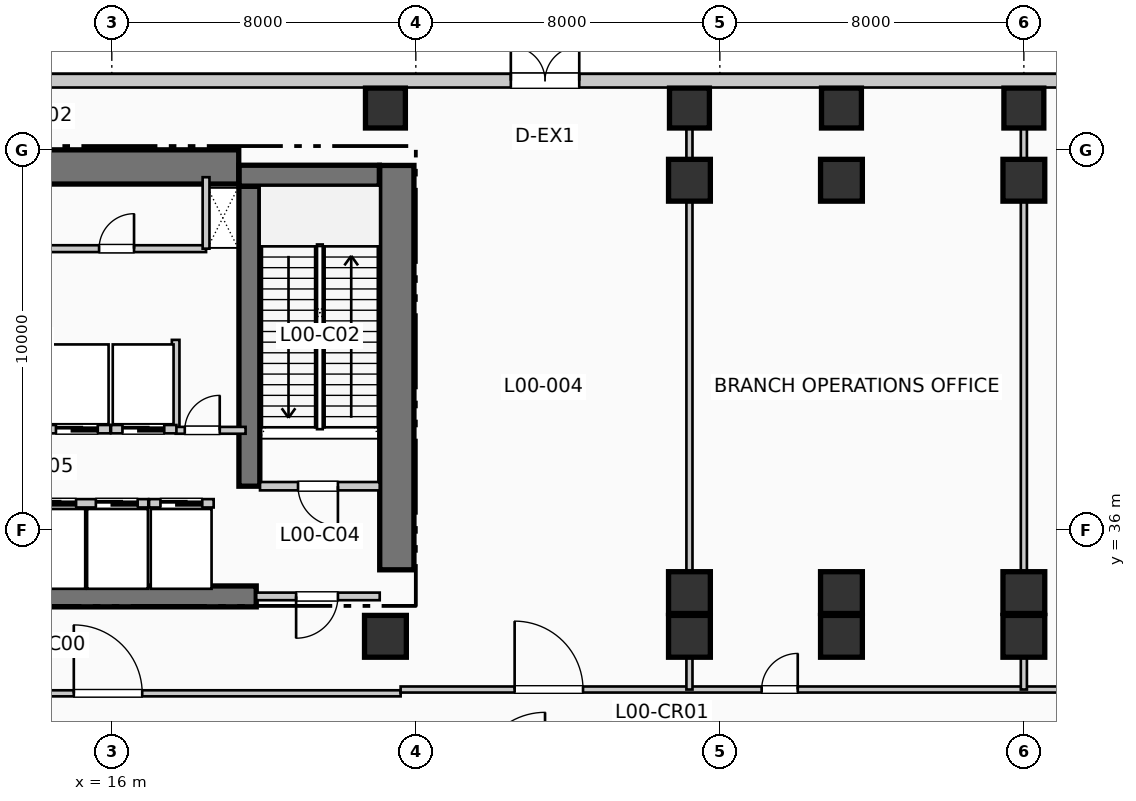
"""IFC4 building model, lengths in metres.
Left out: names, types, materials, properties, quantities, classifications, styles, units other than length and angle.
Written with IfcOpenShell. Run it as: python <this file> out.ifc"""

import sys

from ifc_helpers import new_model, si_unit, direction, frame, frame_2d, origin, origin_2d, place, context, subcontext, project, spatial, rectangle, extrude, element, fill, save


model = new_model("IFC4")
c1 = context("Model", 3, precision=1e-05, world=origin(), true_north=direction((0.0, 1.0)))
c2 = subcontext(c1, "Body", "Model", "MODEL_VIEW")
j1 = project(units=[si_unit("LENGTHUNIT", "METRE"), si_unit("PLANEANGLEUNIT", "RADIAN")], contexts=[c1])
p1 = place(None, origin())
s1 = spatial("IfcSite", under=j1, at=p1, CompositionType="ELEMENT")
p2 = place(p1, origin())
s2 = spatial("IfcBuilding", under=s1, at=p2, CompositionType="ELEMENT")
p3 = place(p2, origin())
s3 = spatial("IfcBuildingStorey", under=s2, at=p3, CompositionType="ELEMENT", Elevation=0.0)
p4 = place(p3, frame((5.36, 45.55, 0.0), z_axis=(0.0, 0.0, 1.0), x_axis=(1.0, 0.0, 0.0)))
e1 = element("IfcWall", 1, at=p4, inside=s3, PredefinedType="SHEAR", context=c2, shape_type="SweptSolid", body=[
    extrude(rectangle(XDim=13.98, YDim=0.9, at=frame_2d((6.99, 0.0))), origin(), (0.0, 0.0, 1.0), 5.94),
])
p5 = place(p3, frame((23.5, 34.95, 0.0), z_axis=(0.0, 0.0, 1.0), x_axis=(0.0, 1.0, 0.0)))
e2 = element("IfcWall", 2, at=p5, inside=s3, PredefinedType="SHEAR", context=c2, shape_type="SweptSolid", body=[
    extrude(rectangle(XDim=10.64, YDim=0.9, at=frame_2d((5.32, 0.0))), origin(), (0.0, 0.0, 1.0), 5.94),
])
p6 = place(p3, frame((13.68, 34.25, 0.0), z_axis=(0.0, 0.0, 1.0), x_axis=(1.0, 0.0, 0.0)))
e3 = element("IfcWall", 3, at=p6, inside=s3, PredefinedType="SHEAR", context=c2, shape_type="SweptSolid", body=[
    extrude(rectangle(XDim=6.12, YDim=0.55, at=frame_2d((3.06, 0.0))), origin(), (0.0, 0.0, 1.0), 5.94),
])
p7 = place(p3, frame((19.62, 37.15, 0.0), z_axis=(0.0, 0.0, 1.0), x_axis=(0.0, 1.0, 0.0)))
e4 = element("IfcWall", 4, at=p7, inside=s3, PredefinedType="SHEAR", context=c2, shape_type="SweptSolid", body=[
    extrude(rectangle(XDim=7.89, YDim=0.55, at=frame_2d((3.945, 0.0))), origin(), (0.0, 0.0, 1.0), 5.94),
])
p8 = place(p3, frame((19.35, 45.32, 0.0), z_axis=(0.0, 0.0, 1.0), x_axis=(1.0, 0.0, 0.0)))
e5 = element("IfcWall", 5, at=p8, inside=s3, PredefinedType="SHEAR", context=c2, shape_type="SweptSolid", body=[
    extrude(rectangle(XDim=3.69, YDim=0.55, at=frame_2d((1.845, 0.0))), origin(), (0.0, 0.0, 1.0), 5.94),
])
p9 = place(p3, frame((23.2, 33.2, 0.0), z_axis=(0.0, 0.0, 1.0), x_axis=(1.0, 0.0, 0.0)))
e6 = element("IfcColumn", 6, at=p9, inside=s3, PredefinedType="COLUMN", context=c2, shape_type="SweptSolid", body=[
    extrude(rectangle(XDim=1.1, YDim=1.1, at=origin_2d()), origin(), (0.0, 0.0, 1.0), 5.94),
])
p10 = place(p3, frame((23.2, 47.1, 0.0), z_axis=(0.0, 0.0, 1.0), x_axis=(1.0, 0.0, 0.0)))
e7 = element("IfcColumn", 7, at=p10, inside=s3, PredefinedType="COLUMN", context=c2, shape_type="SweptSolid", body=[
    extrude(rectangle(XDim=1.05, YDim=1.05, at=origin_2d()), origin(), (0.0, 0.0, 1.0), 5.94),
])
for number, where, z_axis, x_axis in (
    (8, (31.2, 33.2, 0.0), (0.0, 0.0, 1.0), (1.0, 0.0, 0.0)),
    (9, (31.2, 34.35, 0.0), (0.0, 0.0, 1.0), (1.0, 0.0, 0.0)),
    (10, (31.2, 45.2, 0.0), (0.0, 0.0, 1.0), (1.0, 0.0, 0.0)),
):
    element("IfcColumn", number, at=place(p3, frame(where, z_axis=z_axis, x_axis=x_axis)), inside=s3, PredefinedType="COLUMN", context=c2, shape_type="SweptSolid", body=[
        extrude(rectangle(XDim=1.1, YDim=1.1, at=origin_2d()), origin(), (0.0, 0.0, 1.0), 5.94),
    ])
p11 = place(p3, frame((31.2, 47.1, 0.0), z_axis=(0.0, 0.0, 1.0), x_axis=(1.0, 0.0, 0.0)))
e11 = element("IfcColumn", 11, at=p11, inside=s3, PredefinedType="COLUMN", context=c2, shape_type="SweptSolid", body=[
    extrude(rectangle(XDim=1.05, YDim=1.05, at=origin_2d()), origin(), (0.0, 0.0, 1.0), 5.94),
])
for number, where, z_axis, x_axis in (
    (12, (35.2, 33.2, 0.0), (0.0, 0.0, 1.0), (1.0, 0.0, 0.0)),
    (13, (35.2, 34.35, 0.0), (0.0, 0.0, 1.0), (1.0, 0.0, 0.0)),
    (14, (35.2, 45.2, 0.0), (0.0, 0.0, 1.0), (1.0, 0.0, 0.0)),
):
    element("IfcColumn", number, at=place(p3, frame(where, z_axis=z_axis, x_axis=x_axis)), inside=s3, PredefinedType="COLUMN", context=c2, shape_type="SweptSolid", body=[
        extrude(rectangle(XDim=1.1, YDim=1.1, at=origin_2d()), origin(), (0.0, 0.0, 1.0), 5.94),
    ])
p12 = place(p3, frame((35.2, 47.1, 0.0), z_axis=(0.0, 0.0, 1.0), x_axis=(1.0, 0.0, 0.0)))
e15 = element("IfcColumn", 15, at=p12, inside=s3, PredefinedType="COLUMN", context=c2, shape_type="SweptSolid", body=[
    extrude(rectangle(XDim=1.05, YDim=1.05, at=origin_2d()), origin(), (0.0, 0.0, 1.0), 5.94),
])
for number, where, z_axis, x_axis in (
    (16, (40.0, 33.2, 0.0), (0.0, 0.0, 1.0), (1.0, 0.0, 0.0)),
    (17, (40.0, 34.35, 0.0), (0.0, 0.0, 1.0), (1.0, 0.0, 0.0)),
    (18, (40.0, 45.2, 0.0), (0.0, 0.0, 1.0), (1.0, 0.0, 0.0)),
):
    element("IfcColumn", number, at=place(p3, frame(where, z_axis=z_axis, x_axis=x_axis)), inside=s3, PredefinedType="COLUMN", context=c2, shape_type="SweptSolid", body=[
        extrude(rectangle(XDim=1.1, YDim=1.1, at=origin_2d()), origin(), (0.0, 0.0, 1.0), 5.94),
    ])
p13 = place(p3, frame((40.0, 47.1, 0.0), z_axis=(0.0, 0.0, 1.0), x_axis=(1.0, 0.0, 0.0)))
e19 = element("IfcColumn", 19, at=p13, inside=s3, PredefinedType="COLUMN", context=c2, shape_type="SweptSolid", body=[
    extrude(rectangle(XDim=1.05, YDim=1.05, at=origin_2d()), origin(), (0.0, 0.0, 1.0), 5.94),
])
p14 = place(p3, frame((78.945, 47.82, 0.0), z_axis=(0.0, 0.0, 1.0), x_axis=(-1.0, 0.0, 0.0)))
e20 = element("IfcWall", 20, at=p14, inside=s3, PredefinedType="SOLIDWALL", context=c2, shape_type="SweptSolid", body=[
    extrude(rectangle(XDim=77.89, YDim=0.36, at=frame_2d((38.945, 0.0))), origin(), (0.0, 0.0, 1.0), 5.62),
])
p15 = place(p14, frame((22.145, 0.0, 0.0), z_axis=(0.0, 0.0, 1.0), x_axis=(-1.0, 0.0, 0.0)))
e21 = element("IfcOpeningElement", 21, at=p15, cuts=e20, PredefinedType="OPENING", context=c2, shape_type="SweptSolid", body=[
    extrude(rectangle(XDim=4.8, YDim=2.6, at=frame_2d((2.4, 1.3))), frame((0.0, 0.19, 0.0), z_axis=(0.0, -1.0, 0.0), x_axis=(1.0, 0.0, 0.0)), (0.0, 0.0, 1.0), 0.38),
])
p16 = place(p14, frame((11.545, 0.0, 0.0), z_axis=(0.0, 0.0, 1.0), x_axis=(-1.0, 0.0, 0.0)))
e22 = element("IfcOpeningElement", 22, at=p16, cuts=e20, PredefinedType="OPENING", context=c2, shape_type="SweptSolid", body=[
    extrude(rectangle(XDim=4.0, YDim=3.2, at=frame_2d((2.0, 1.6))), frame((0.0, 0.19, 0.0), z_axis=(0.0, -1.0, 0.0), x_axis=(1.0, 0.0, 0.0)), (0.0, 0.0, 1.0), 0.38),
])
p17 = place(p14, frame((52.445, 0.0, 0.0), z_axis=(0.0, 0.0, 1.0), x_axis=(-1.0, 0.0, 0.0)))
e23 = element("IfcOpeningElement", 23, at=p17, cuts=e20, PredefinedType="OPENING", context=c2, shape_type="SweptSolid", body=[
    extrude(rectangle(XDim=1.8, YDim=2.4, at=frame_2d((0.9, 1.2))), frame((0.0, 0.19, 0.0), z_axis=(0.0, -1.0, 0.0), x_axis=(1.0, 0.0, 0.0)), (0.0, 0.0, 1.0), 0.38),
])
p18 = place(p3, frame((19.9, 37.15, 0.0), z_axis=(0.0, 0.0, 1.0), x_axis=(1.0, 0.0, 0.0)))
e24 = element("IfcWall", 24, at=p18, inside=s3, PredefinedType="PARTITIONING", context=c2, shape_type="SweptSolid", body=[
    extrude(rectangle(XDim=3.15, YDim=0.22, at=frame_2d((1.575, 0.0))), origin(), (0.0, 0.0, 1.0), 5.62),
])
p19 = place(p18, frame((2.05, 0.0, 0.0), z_axis=(0.0, 0.0, 1.0), x_axis=(-1.0, 0.0, 0.0)))
e25 = element("IfcOpeningElement", 25, at=p19, cuts=e24, PredefinedType="OPENING", context=c2, shape_type="SweptSolid", body=[
    extrude(rectangle(XDim=1.05, YDim=2.15, at=frame_2d((0.525, 1.075))), frame((0.0, 0.12, 0.0), z_axis=(0.0, -1.0, 0.0), x_axis=(1.0, 0.0, 0.0)), (0.0, 0.0, 1.0), 0.24),
])
p20 = place(p3, frame((19.8, 34.25, 0.0), z_axis=(0.0, 0.0, 1.0), x_axis=(1.0, 0.0, 0.0)))
e26 = element("IfcWall", 26, at=p20, inside=s3, PredefinedType="PARTITIONING", context=c2, shape_type="SweptSolid", body=[
    extrude(rectangle(XDim=3.25, YDim=0.2, at=frame_2d((1.625, 0.0))), origin(), (0.0, 0.0, 1.0), 5.62),
])
p21 = place(p20, frame((2.15, 0.0, 0.0), z_axis=(0.0, 0.0, 1.0), x_axis=(-1.0, 0.0, 0.0)))
e27 = element("IfcOpeningElement", 27, at=p21, cuts=e26, PredefinedType="OPENING", context=c2, shape_type="SweptSolid", body=[
    extrude(rectangle(XDim=1.1, YDim=2.15, at=frame_2d((0.55, 1.075))), frame((0.0, 0.11, 0.0), z_axis=(0.0, -1.0, 0.0), x_axis=(1.0, 0.0, 0.0)), (0.0, 0.0, 1.0), 0.22),
])
p22 = place(p3, frame((17.68, 38.65, 0.0), z_axis=(0.0, 0.0, 1.0), x_axis=(0.0, 1.0, 0.0)))
e28 = element("IfcWall", 28, at=p22, inside=s3, PredefinedType="PARTITIONING", context=c2, shape_type="SweptSolid", body=[
    extrude(rectangle(XDim=2.35, YDim=0.2, at=frame_2d((1.175, 0.0))), origin(), (0.0, 0.0, 1.0), 5.62),
])
p23 = place(p3, frame((17.68, 38.62, 0.0), z_axis=(0.0, 0.0, 1.0), x_axis=(1.0, 0.0, 0.0)))
e29 = element("IfcWall", 29, at=p23, inside=s3, PredefinedType="PARTITIONING", context=c2, shape_type="SweptSolid", body=[
    extrude(rectangle(XDim=1.84, YDim=0.18, at=frame_2d((0.92, 0.0))), origin(), (0.0, 0.0, 1.0), 5.62),
])
p24 = place(p23, frame((0.24, 0.0, 0.0)))
e30 = element("IfcOpeningElement", 30, at=p24, cuts=e29, PredefinedType="OPENING", context=c2, shape_type="SweptSolid", body=[
    extrude(rectangle(XDim=0.92, YDim=2.1, at=frame_2d((0.46, 1.05))), frame((0.0, 0.1, 0.0), z_axis=(0.0, -1.0, 0.0), x_axis=(1.0, 0.0, 0.0)), (0.0, 0.0, 1.0), 0.2),
])
p25 = place(p3, frame((13.68, 36.7, 0.0), z_axis=(0.0, 0.0, 1.0), x_axis=(1.0, 0.0, 0.0)))
e31 = element("IfcWall", 31, at=p25, inside=s3, PredefinedType="PARTITIONING", context=c2, shape_type="SweptSolid", body=[
    extrude(rectangle(XDim=3.28, YDim=0.22, at=frame_2d((1.64, 0.0))), origin(), (0.0, 0.0, 1.0), 5.62),
])
p26 = place(p25, frame((0.28, 0.0, 0.0)))
e32 = element("IfcOpeningElement", 32, at=p26, cuts=e31, PredefinedType="OPENING", context=c2, shape_type="SweptSolid", body=[
    extrude(rectangle(XDim=1.1, YDim=2.2, at=frame_2d((0.55, 1.1))), frame((0.0, 0.12, 0.0), z_axis=(0.0, -1.0, 0.0), x_axis=(1.0, 0.0, 0.0)), (0.0, 0.0, 1.0), 0.24),
])
p27 = place(p25, frame((1.9, 0.0, 0.0)))
e33 = element("IfcOpeningElement", 33, at=p27, cuts=e31, PredefinedType="OPENING", context=c2, shape_type="SweptSolid", body=[
    extrude(rectangle(XDim=1.1, YDim=2.2, at=frame_2d((0.55, 1.1))), frame((0.0, 0.12, 0.0), z_axis=(0.0, -1.0, 0.0), x_axis=(1.0, 0.0, 0.0)), (0.0, 0.0, 1.0), 0.24),
])
p28 = place(p3, frame((12.58, 38.65, 0.0), z_axis=(0.0, 0.0, 1.0), x_axis=(1.0, 0.0, 0.0)))
e34 = element("IfcWall", 34, at=p28, inside=s3, PredefinedType="PARTITIONING", context=c2, shape_type="SweptSolid", body=[
    extrude(rectangle(XDim=3.38, YDim=0.22, at=frame_2d((1.69, 0.0))), origin(), (0.0, 0.0, 1.0), 5.62),
])
p29 = place(p28, frame((0.3, 0.0, 0.0)))
e35 = element("IfcOpeningElement", 35, at=p29, cuts=e34, PredefinedType="OPENING", context=c2, shape_type="SweptSolid", body=[
    extrude(rectangle(XDim=1.1, YDim=2.2, at=frame_2d((0.55, 1.1))), frame((0.0, 0.12, 0.0), z_axis=(0.0, -1.0, 0.0), x_axis=(1.0, 0.0, 0.0)), (0.0, 0.0, 1.0), 0.24),
])
p30 = place(p28, frame((1.95, 0.0, 0.0)))
e36 = element("IfcOpeningElement", 36, at=p30, cuts=e34, PredefinedType="OPENING", context=c2, shape_type="SweptSolid", body=[
    extrude(rectangle(XDim=1.1, YDim=2.2, at=frame_2d((0.55, 1.1))), frame((0.0, 0.12, 0.0), z_axis=(0.0, -1.0, 0.0), x_axis=(1.0, 0.0, 0.0)), (0.0, 0.0, 1.0), 0.24),
])
p31 = place(p3, frame((16.98, 36.7, 0.0), z_axis=(0.0, 0.0, 1.0), x_axis=(1.0, 0.0, 0.0)))
e37 = element("IfcWall", 37, at=p31, inside=s3, PredefinedType="PARTITIONING", context=c2, shape_type="SweptSolid", body=[
    extrude(rectangle(XDim=1.7, YDim=0.22, at=frame_2d((0.85, 0.0))), origin(), (0.0, 0.0, 1.0), 5.62),
])
p32 = place(p31, frame((0.3, 0.0, 0.0)))
e38 = element("IfcOpeningElement", 38, at=p32, cuts=e37, PredefinedType="OPENING", context=c2, shape_type="SweptSolid", body=[
    extrude(rectangle(XDim=1.1, YDim=2.2, at=frame_2d((0.55, 1.1))), frame((0.0, 0.12, 0.0), z_axis=(0.0, -1.0, 0.0), x_axis=(1.0, 0.0, 0.0)), (0.0, 0.0, 1.0), 0.24),
])
p33 = place(p3, frame((15.98, 38.65, 0.0), z_axis=(0.0, 0.0, 1.0), x_axis=(1.0, 0.0, 0.0)))
e39 = element("IfcWall", 39, at=p33, inside=s3, PredefinedType="PARTITIONING", context=c2, shape_type="SweptSolid", body=[
    extrude(rectangle(XDim=1.72, YDim=0.22, at=frame_2d((0.86, 0.0))), origin(), (0.0, 0.0, 1.0), 5.62),
])
p34 = place(p33, frame((0.3, 0.0, 0.0)))
e40 = element("IfcOpeningElement", 40, at=p34, cuts=e39, PredefinedType="OPENING", context=c2, shape_type="SweptSolid", body=[
    extrude(rectangle(XDim=1.1, YDim=2.2, at=frame_2d((0.55, 1.1))), frame((0.0, 0.12, 0.0), z_axis=(0.0, -1.0, 0.0), x_axis=(1.0, 0.0, 0.0)), (0.0, 0.0, 1.0), 0.24),
])
p35 = place(p3, frame((9.15, 43.4, 0.0), z_axis=(0.0, 0.0, 1.0), x_axis=(1.0, 0.0, 0.0)))
e41 = element("IfcWall", 41, at=p35, inside=s3, PredefinedType="PLUMBINGWALL", context=c2, shape_type="SweptSolid", body=[
    extrude(rectangle(XDim=9.33, YDim=0.18, at=frame_2d((4.665, 0.0))), origin(), (0.0, 0.0, 1.0), 5.62),
])
p36 = place(p35, frame((1.88, 0.0, 0.0)))
e42 = element("IfcOpeningElement", 42, at=p36, cuts=e41, PredefinedType="OPENING", context=c2, shape_type="SweptSolid", body=[
    extrude(rectangle(XDim=0.92, YDim=2.1, at=frame_2d((0.46, 1.05))), frame((0.0, 0.1, 0.0), z_axis=(0.0, -1.0, 0.0), x_axis=(1.0, 0.0, 0.0)), (0.0, 0.0, 1.0), 0.2),
])
p37 = place(p35, frame((6.515, 0.0, 0.0)))
e43 = element("IfcOpeningElement", 43, at=p37, cuts=e41, PredefinedType="OPENING", context=c2, shape_type="SweptSolid", body=[
    extrude(rectangle(XDim=0.92, YDim=2.1, at=frame_2d((0.46, 1.05))), frame((0.0, 0.1, 0.0), z_axis=(0.0, -1.0, 0.0), x_axis=(1.0, 0.0, 0.0)), (0.0, 0.0, 1.0), 0.2),
])
p38 = place(p3, frame((18.48, 43.4, 0.0), z_axis=(0.0, 0.0, 1.0), x_axis=(0.0, 1.0, 0.0)))
e44 = element("IfcWall", 44, at=p38, inside=s3, PredefinedType="PLUMBINGWALL", context=c2, shape_type="SweptSolid", body=[
    extrude(rectangle(XDim=1.88, YDim=0.18, at=frame_2d((0.94, 0.0))), origin(), (0.0, 0.0, 1.0), 5.62),
])
p39 = place(p3, frame((5.5, 31.7, 0.0), z_axis=(0.0, 0.0, 1.0), x_axis=(1.0, 0.0, 0.0)))
e45 = element("IfcWall", 45, at=p39, inside=s3, PredefinedType="PARTITIONING", context=c2, shape_type="SweptSolid", body=[
    extrude(rectangle(XDim=18.1, YDim=0.16, at=frame_2d((9.05, 0.0))), origin(), (0.0, 0.0, 1.0), 5.62),
])
p40 = place(p39, frame((0.45, 0.0, 0.0)))
e46 = element("IfcOpeningElement", 46, at=p40, cuts=e45, PredefinedType="OPENING", context=c2, shape_type="SweptSolid", body=[
    extrude(rectangle(XDim=1.1, YDim=2.15, at=frame_2d((0.55, 1.075))), frame((0.0, 0.09, 0.0), z_axis=(0.0, -1.0, 0.0), x_axis=(1.0, 0.0, 0.0)), (0.0, 0.0, 1.0), 0.18),
])
p41 = place(p39, frame((9.5, 0.0, 0.0)))
e47 = element("IfcOpeningElement", 47, at=p41, cuts=e45, PredefinedType="OPENING", context=c2, shape_type="SweptSolid", body=[
    extrude(rectangle(XDim=1.8, YDim=2.3, at=frame_2d((0.9, 1.15))), frame((0.0, 0.09, 0.0), z_axis=(0.0, -1.0, 0.0), x_axis=(1.0, 0.0, 0.0)), (0.0, 0.0, 1.0), 0.18),
])
p42 = place(p3, frame((23.6, 31.8, 0.0), z_axis=(0.0, 0.0, 1.0), x_axis=(1.0, 0.0, 0.0)))
e48 = element("IfcWall", 48, at=p42, inside=s3, PredefinedType="PARTITIONING", context=c2, shape_type="SweptSolid", body=[
    extrude(rectangle(XDim=32.0, YDim=0.16, at=frame_2d((16.0, 0.0))), origin(), (0.0, 0.0, 1.0), 5.62),
])
p43 = place(p42, frame((3.0, 0.0, 0.0)))
e49 = element("IfcOpeningElement", 49, at=p43, cuts=e48, PredefinedType="OPENING", context=c2, shape_type="SweptSolid", body=[
    extrude(rectangle(XDim=1.8, YDim=2.3, at=frame_2d((0.9, 1.15))), frame((0.0, 0.09, 0.0), z_axis=(0.0, -1.0, 0.0), x_axis=(1.0, 0.0, 0.0)), (0.0, 0.0, 1.0), 0.18),
])
p44 = place(p42, frame((9.5, 0.0, 0.0)))
e50 = element("IfcOpeningElement", 50, at=p44, cuts=e48, PredefinedType="OPENING", context=c2, shape_type="SweptSolid", body=[
    extrude(rectangle(XDim=0.95, YDim=2.15, at=frame_2d((0.475, 1.075))), frame((0.0, 0.09, 0.0), z_axis=(0.0, -1.0, 0.0), x_axis=(1.0, 0.0, 0.0)), (0.0, 0.0, 1.0), 0.18),
])
p45 = place(p42, frame((20.0, 0.0, 0.0)))
e51 = element("IfcOpeningElement", 51, at=p45, cuts=e48, PredefinedType="OPENING", context=c2, shape_type="SweptSolid", body=[
    extrude(rectangle(XDim=1.8, YDim=2.3, at=frame_2d((0.9, 1.15))), frame((0.0, 0.09, 0.0), z_axis=(0.0, -1.0, 0.0), x_axis=(1.0, 0.0, 0.0)), (0.0, 0.0, 1.0), 0.18),
])
for number, where, z_axis, x_axis in (
    (52, (31.2, 31.8, 0.0), (0.0, 0.0, 1.0), (0.0, 1.0, 0.0)),
    (53, (40.0, 31.8, 0.0), (0.0, 0.0, 1.0), (0.0, 1.0, 0.0)),
):
    element("IfcWall", number, at=place(p3, frame(where, z_axis=z_axis, x_axis=x_axis)), inside=s3, PredefinedType="PARTITIONING", context=c2, shape_type="SweptSolid", body=[
        extrude(rectangle(XDim=15.84, YDim=0.16, at=frame_2d((7.92, 0.0))), origin(), (0.0, 0.0, 1.0), 4.805),
    ])
p46 = place(p17, origin())
e54 = element("IfcDoor", 54, at=p46, inside=s3, OperationType="DOUBLE_DOOR_SINGLE_SWING", PredefinedType="DOOR", context=c2, shape_type="SweptSolid", body=[
    extrude(rectangle(XDim=1.8, YDim=2.4, at=frame_2d((0.9, 1.2))), frame((0.0, 0.025, 0.0), z_axis=(0.0, -1.0, 0.0), x_axis=(1.0, 0.0, 0.0)), (0.0, 0.0, 1.0), 0.05),
])
fill(e23, e54)
p47 = place(p19, origin())
e55 = element("IfcDoor", 55, at=p47, inside=s3, OperationType="SINGLE_SWING_RIGHT", PredefinedType="DOOR", context=c2, shape_type="SweptSolid", body=[
    extrude(rectangle(XDim=1.05, YDim=2.15, at=frame_2d((0.525, 1.075))), frame((0.0, 0.025, 0.0), z_axis=(0.0, -1.0, 0.0), x_axis=(1.0, 0.0, 0.0)), (0.0, 0.0, 1.0), 0.05),
])
fill(e25, e55)
p48 = place(p21, origin())
e56 = element("IfcDoor", 56, at=p48, inside=s3, OperationType="SINGLE_SWING_LEFT", PredefinedType="DOOR", context=c2, shape_type="SweptSolid", body=[
    extrude(rectangle(XDim=1.1, YDim=2.15, at=frame_2d((0.55, 1.075))), frame((0.0, 0.025, 0.0), z_axis=(0.0, -1.0, 0.0), x_axis=(1.0, 0.0, 0.0)), (0.0, 0.0, 1.0), 0.05),
])
fill(e27, e56)
p49 = place(p24, origin())
e57 = element("IfcDoor", 57, at=p49, inside=s3, OperationType="SINGLE_SWING_RIGHT", PredefinedType="DOOR", context=c2, shape_type="SweptSolid", body=[
    extrude(rectangle(XDim=0.92, YDim=2.1, at=frame_2d((0.46, 1.05))), frame((0.0, 0.025, 0.0), z_axis=(0.0, -1.0, 0.0), x_axis=(1.0, 0.0, 0.0)), (0.0, 0.0, 1.0), 0.05),
])
fill(e30, e57)
p50 = place(p26, origin())
e58 = element("IfcDoor", 58, at=p50, inside=s3, OperationType="SLIDING_TO_RIGHT", PredefinedType="DOOR", context=c2, shape_type="SweptSolid", body=[
    extrude(rectangle(XDim=1.1, YDim=2.2, at=frame_2d((0.55, 1.1))), frame((0.0, 0.025, 0.0), z_axis=(0.0, -1.0, 0.0), x_axis=(1.0, 0.0, 0.0)), (0.0, 0.0, 1.0), 0.05),
])
fill(e32, e58)
p51 = place(p27, origin())
e59 = element("IfcDoor", 59, at=p51, inside=s3, OperationType="SLIDING_TO_RIGHT", PredefinedType="DOOR", context=c2, shape_type="SweptSolid", body=[
    extrude(rectangle(XDim=1.1, YDim=2.2, at=frame_2d((0.55, 1.1))), frame((0.0, 0.025, 0.0), z_axis=(0.0, -1.0, 0.0), x_axis=(1.0, 0.0, 0.0)), (0.0, 0.0, 1.0), 0.05),
])
fill(e33, e59)
p52 = place(p30, origin())
e60 = element("IfcDoor", 60, at=p52, inside=s3, OperationType="SLIDING_TO_RIGHT", PredefinedType="DOOR", context=c2, shape_type="SweptSolid", body=[
    extrude(rectangle(XDim=1.1, YDim=2.2, at=frame_2d((0.55, 1.1))), frame((0.0, 0.025, 0.0), z_axis=(0.0, -1.0, 0.0), x_axis=(1.0, 0.0, 0.0)), (0.0, 0.0, 1.0), 0.05),
])
fill(e36, e60)
p53 = place(p32, origin())
e61 = element("IfcDoor", 61, at=p53, inside=s3, OperationType="SLIDING_TO_LEFT", PredefinedType="DOOR", context=c2, shape_type="SweptSolid", body=[
    extrude(rectangle(XDim=1.1, YDim=2.2, at=frame_2d((0.55, 1.1))), frame((0.0, 0.025, 0.0), z_axis=(0.0, -1.0, 0.0), x_axis=(1.0, 0.0, 0.0)), (0.0, 0.0, 1.0), 0.05),
])
fill(e38, e61)
p54 = place(p34, origin())
e62 = element("IfcDoor", 62, at=p54, inside=s3, OperationType="SLIDING_TO_LEFT", PredefinedType="DOOR", context=c2, shape_type="SweptSolid", body=[
    extrude(rectangle(XDim=1.1, YDim=2.2, at=frame_2d((0.55, 1.1))), frame((0.0, 0.025, 0.0), z_axis=(0.0, -1.0, 0.0), x_axis=(1.0, 0.0, 0.0)), (0.0, 0.0, 1.0), 0.05),
])
fill(e40, e62)
p55 = place(p37, origin())
e63 = element("IfcDoor", 63, at=p55, inside=s3, OperationType="SINGLE_SWING_RIGHT", PredefinedType="DOOR", context=c2, shape_type="SweptSolid", body=[
    extrude(rectangle(XDim=0.92, YDim=2.1, at=frame_2d((0.46, 1.05))), frame((0.0, 0.025, 0.0), z_axis=(0.0, -1.0, 0.0), x_axis=(1.0, 0.0, 0.0)), (0.0, 0.0, 1.0), 0.05),
])
fill(e43, e63)
p56 = place(p41, origin())
e64 = element("IfcDoor", 64, at=p56, inside=s3, OperationType="SINGLE_SWING_LEFT", PredefinedType="DOOR", context=c2, shape_type="SweptSolid", body=[
    extrude(rectangle(XDim=1.8, YDim=2.3, at=frame_2d((0.9, 1.15))), frame((0.0, 0.025, 0.0), z_axis=(0.0, -1.0, 0.0), x_axis=(1.0, 0.0, 0.0)), (0.0, 0.0, 1.0), 0.05),
])
fill(e47, e64)
p57 = place(p43, origin())
e65 = element("IfcDoor", 65, at=p57, inside=s3, OperationType="SINGLE_SWING_LEFT", PredefinedType="DOOR", context=c2, shape_type="SweptSolid", body=[
    extrude(rectangle(XDim=1.8, YDim=2.3, at=frame_2d((0.9, 1.15))), frame((0.0, 0.025, 0.0), z_axis=(0.0, -1.0, 0.0), x_axis=(1.0, 0.0, 0.0)), (0.0, 0.0, 1.0), 0.05),
])
fill(e49, e65)
p58 = place(p44, origin())
e66 = element("IfcDoor", 66, at=p58, inside=s3, OperationType="SINGLE_SWING_RIGHT", PredefinedType="DOOR", context=c2, shape_type="SweptSolid", body=[
    extrude(rectangle(XDim=0.95, YDim=2.15, at=frame_2d((0.475, 1.075))), frame((0.0, 0.025, 0.0), z_axis=(0.0, -1.0, 0.0), x_axis=(1.0, 0.0, 0.0)), (0.0, 0.0, 1.0), 0.05),
])
fill(e50, e66)
save(model, sys.argv[1])
